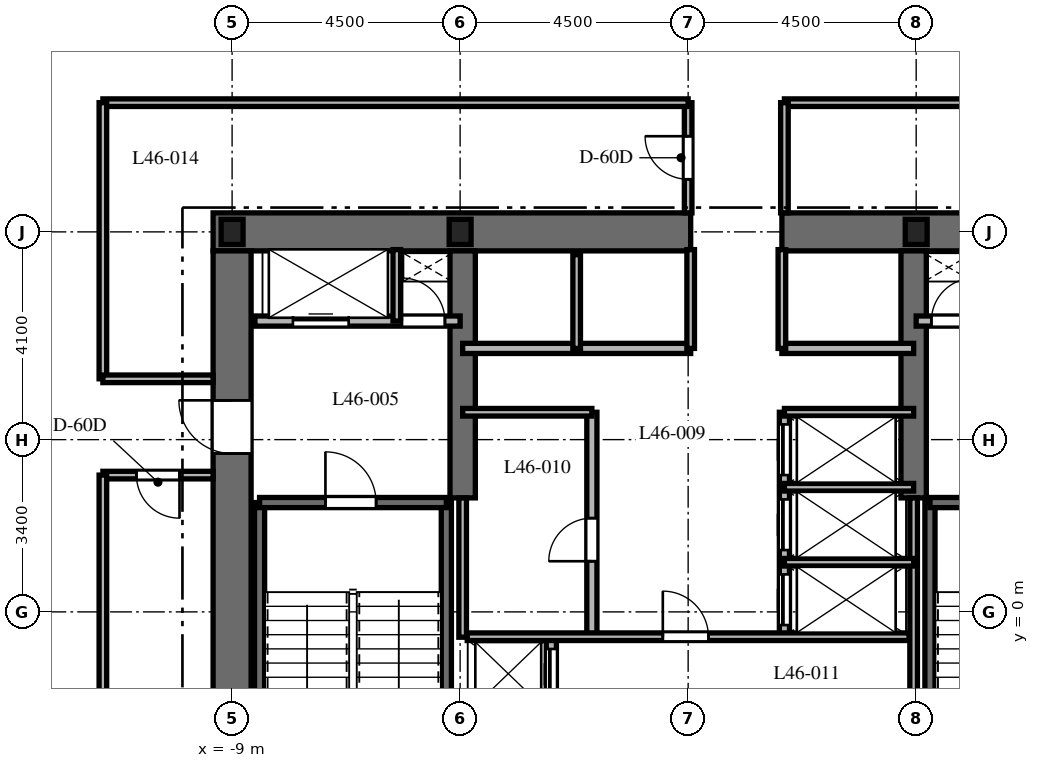
"""IFC4 building model, lengths in metres.
Left out: names, types, materials, properties, quantities, classifications, styles, units other than length and angle.
Written with IfcOpenShell. Run it as: python <this file> out.ifc"""

import sys

from ifc_helpers import new_model, si_unit, direction, frame, frame_2d, origin, origin_2d, place, context, subcontext, project, spatial, rectangle, i_section, extrude, element, fill, save


model = new_model("IFC4")
c1 = context("Model", 3, precision=1e-05, world=origin(), true_north=direction((0.0, 1.0)))
c2 = subcontext(c1, "Body", "Model", "MODEL_VIEW")
j1 = project(units=[si_unit("LENGTHUNIT", "METRE"), si_unit("PLANEANGLEUNIT", "RADIAN")], contexts=[c1])
p1 = place(None, origin())
s1 = spatial("IfcSite", under=j1, at=p1, CompositionType="ELEMENT")
p2 = place(p1, origin())
s2 = spatial("IfcBuilding", under=s1, at=p2, CompositionType="ELEMENT")
p3 = place(p2, frame((0.0, 0.0, 186.7)))
s3 = spatial("IfcBuildingStorey", under=s2, at=p3, CompositionType="ELEMENT", Elevation=186.7)
p4 = place(p3, frame((-9.375, 7.5, 0.0), z_axis=(0.0, 0.0, 1.0), x_axis=(1.0, 0.0, 0.0)))
e1 = element("IfcWall", 1, at=p4, inside=s3, PredefinedType="SHEAR", context=c2, shape_type="SweptSolid", body=[
    extrude(rectangle(XDim=9.425, YDim=0.75, at=frame_2d((4.712, 0.0))), origin(), (0.0, 0.0, 1.0), 3.7),
])
p5 = place(p3, frame((1.85, 7.5, 0.0), z_axis=(0.0, 0.0, 1.0), x_axis=(1.0, 0.0, 0.0)))
e2 = element("IfcWall", 2, at=p5, inside=s3, PredefinedType="SHEAR", context=c2, shape_type="SweptSolid", body=[
    extrude(rectangle(XDim=7.525, YDim=0.75, at=frame_2d((3.762, 0.0))), origin(), (0.0, 0.0, 1.0), 3.7),
])
p6 = place(p3, frame((-9.0, -7.125, 0.0), z_axis=(0.0, 0.0, 1.0), x_axis=(0.0, 1.0, 0.0)))
e3 = element("IfcWall", 3, at=p6, inside=s3, PredefinedType="SHEAR", context=c2, shape_type="SweptSolid", body=[
    extrude(rectangle(XDim=14.25, YDim=0.75, at=frame_2d((7.125, 0.0))), origin(), (0.0, 0.0, 1.0), 3.7),
])
p7 = place(p6, frame((10.25, 0.0, 0.0)))
e4 = element("IfcOpeningElement", 4, at=p7, cuts=e3, PredefinedType="OPENING", context=c2, shape_type="SweptSolid", body=[
    extrude(rectangle(XDim=1.05, YDim=2.15, at=frame_2d((0.525, 1.075))), frame((0.0, 0.385, 0.0), z_axis=(0.0, -1.0, 0.0), x_axis=(1.0, 0.0, 0.0)), (0.0, 0.0, 1.0), 0.77),
])
for number, where, z_axis, x_axis in (
    (5, (-4.45, 2.25, 0.0), (0.0, 0.0, 1.0), (0.0, 1.0, 0.0)),
    (6, (4.45, 2.25, 0.0), (0.0, 0.0, 1.0), (0.0, 1.0, 0.0)),
):
    element("IfcWall", number, at=place(p3, frame(where, z_axis=z_axis, x_axis=x_axis)), inside=s3, PredefinedType="SHEAR", context=c2, shape_type="SweptSolid", body=[
        extrude(rectangle(XDim=4.875, YDim=0.5, at=frame_2d((2.438, 0.0))), origin(), (0.0, 0.0, 1.0), 3.7),
    ])
for number, where, z_axis, x_axis in (
    (7, (-8.458, -6.985, 0.0), (0.0, 0.0, 1.0), (0.0, 1.0, 0.0)),
    (8, (-4.772, -6.985, 0.0), (0.0, 0.0, 1.0), (0.0, 1.0, 0.0)),
):
    element("IfcWall", number, at=place(p3, frame(where, z_axis=z_axis, x_axis=x_axis)), inside=s3, PredefinedType="SHEAR", context=c2, shape_type="SweptSolid", body=[
        extrude(rectangle(XDim=9.143, YDim=0.2, at=frame_2d((4.572, 0.0))), origin(), (0.0, 0.0, 1.0), 3.7),
    ])
p8 = place(p3, frame((-8.458, 2.158, 0.0), z_axis=(0.0, 0.0, 1.0), x_axis=(1.0, 0.0, 0.0)))
e9 = element("IfcWall", 9, at=p8, inside=s3, PredefinedType="SHEAR", context=c2, shape_type="SweptSolid", body=[
    extrude(rectangle(XDim=3.686, YDim=0.2, at=frame_2d((1.843, 0.0))), origin(), (0.0, 0.0, 1.0), 3.7),
])
p9 = place(p8, frame((1.3, 0.0, 0.0)))
e10 = element("IfcOpeningElement", 10, at=p9, cuts=e9, PredefinedType="OPENING", context=c2, shape_type="SweptSolid", body=[
    extrude(rectangle(XDim=1.0, YDim=2.15, at=frame_2d((0.5, 1.075))), frame((0.0, 0.11, 0.0), z_axis=(0.0, -1.0, 0.0), x_axis=(1.0, 0.0, 0.0)), (0.0, 0.0, 1.0), 0.22),
])
p10 = place(p3, frame((4.772, -6.985, 0.0), z_axis=(0.0, 0.0, 1.0), x_axis=(0.0, 1.0, 0.0)))
e11 = element("IfcWall", 11, at=p10, inside=s3, PredefinedType="SHEAR", context=c2, shape_type="SweptSolid", body=[
    extrude(rectangle(XDim=9.143, YDim=0.2, at=frame_2d((4.572, 0.0))), origin(), (0.0, 0.0, 1.0), 3.7),
])
p11 = place(p3, frame((4.772, 2.158, 0.0), z_axis=(0.0, 0.0, 1.0), x_axis=(1.0, 0.0, 0.0)))
e12 = element("IfcWall", 12, at=p11, inside=s3, PredefinedType="SHEAR", context=c2, shape_type="SweptSolid", body=[
    extrude(rectangle(XDim=3.686, YDim=0.2, at=frame_2d((1.843, 0.0))), origin(), (0.0, 0.0, 1.0), 3.7),
])
p12 = place(p11, frame((1.35, 0.0, 0.0)))
e13 = element("IfcOpeningElement", 13, at=p12, cuts=e12, PredefinedType="OPENING", context=c2, shape_type="SweptSolid", body=[
    extrude(rectangle(XDim=1.0, YDim=2.15, at=frame_2d((0.5, 1.075))), frame((0.0, 0.11, 0.0), z_axis=(0.0, -1.0, 0.0), x_axis=(1.0, 0.0, 0.0)), (0.0, 0.0, 1.0), 0.22),
])
for number, where, z_axis, x_axis in (
    (14, (4.5, 7.5, 0.0), (0.0, 0.0, 1.0), (1.0, 0.0, 0.0)),
    (15, (-4.5, 7.5, 0.0), (0.0, 0.0, 1.0), (1.0, 0.0, 0.0)),
    (16, (-9.0, 7.5, 0.0), (0.0, 0.0, 1.0), (1.0, 0.0, 0.0)),
):
    element("IfcColumn", number, at=place(p3, frame(where, z_axis=z_axis, x_axis=x_axis)), inside=s3, PredefinedType="COLUMN", context=c2, shape_type="SweptSolid", body=[
        extrude(i_section(OverallWidth=0.432, OverallDepth=0.498, WebThickness=0.056, FlangeThickness=0.089, at=origin_2d()), origin(), (0.0, 0.0, 1.0), 3.7),
    ])
p13 = place(p3, frame((-8.55, 5.74, 0.0), z_axis=(0.0, 0.0, 1.0), x_axis=(1.0, 0.0, 0.0)))
e17 = element("IfcWall", 17, at=p13, inside=s3, PredefinedType="PARTITIONING", context=c2, shape_type="SweptSolid", body=[
    extrude(rectangle(XDim=4.05, YDim=0.2, at=frame_2d((2.025, 0.0))), origin(), (0.0, 0.0, 1.0), 3.4),
])
p14 = place(p13, frame((0.75, 0.0, 0.0)))
e18 = element("IfcOpeningElement", 18, at=p14, cuts=e17, PredefinedType="OPENING", context=c2, shape_type="SweptSolid", body=[
    extrude(rectangle(XDim=1.1, YDim=2.2, at=frame_2d((0.55, 1.1))), frame((0.0, 0.11, 0.0), z_axis=(0.0, -1.0, 0.0), x_axis=(1.0, 0.0, 0.0)), (0.0, 0.0, 1.0), 0.22),
])
p15 = place(p13, frame((2.9, 0.0, 0.0)))
e19 = element("IfcOpeningElement", 19, at=p15, cuts=e17, PredefinedType="OPENING", context=c2, shape_type="SweptSolid", body=[
    extrude(rectangle(XDim=0.85, YDim=2.03, at=frame_2d((0.425, 1.015))), frame((0.0, 0.11, 0.0), z_axis=(0.0, -1.0, 0.0), x_axis=(1.0, 0.0, 0.0)), (0.0, 0.0, 1.0), 0.22),
])
p16 = place(p3, frame((-5.75, 5.74, 0.0), z_axis=(0.0, 0.0, 1.0), x_axis=(0.0, 1.0, 0.0)))
e20 = element("IfcWall", 20, at=p16, inside=s3, PredefinedType="PARTITIONING", context=c2, shape_type="SweptSolid", body=[
    extrude(rectangle(XDim=1.41, YDim=0.15, at=frame_2d((0.705, 0.0))), origin(), (0.0, 0.0, 1.0), 3.4),
])
p17 = place(p3, frame((4.5, 5.74, 0.0), z_axis=(0.0, 0.0, 1.0), x_axis=(1.0, 0.0, 0.0)))
e21 = element("IfcWall", 21, at=p17, inside=s3, PredefinedType="PARTITIONING", context=c2, shape_type="SweptSolid", body=[
    extrude(rectangle(XDim=4.05, YDim=0.2, at=frame_2d((2.025, 0.0))), origin(), (0.0, 0.0, 1.0), 3.4),
])
p18 = place(p17, frame((0.3, 0.0, 0.0)))
e22 = element("IfcOpeningElement", 22, at=p18, cuts=e21, PredefinedType="OPENING", context=c2, shape_type="SweptSolid", body=[
    extrude(rectangle(XDim=0.85, YDim=2.03, at=frame_2d((0.425, 1.015))), frame((0.0, 0.11, 0.0), z_axis=(0.0, -1.0, 0.0), x_axis=(1.0, 0.0, 0.0)), (0.0, 0.0, 1.0), 0.22),
])
p19 = place(p17, frame((2.15, 0.0, 0.0)))
e23 = element("IfcOpeningElement", 23, at=p19, cuts=e21, PredefinedType="OPENING", context=c2, shape_type="SweptSolid", body=[
    extrude(rectangle(XDim=1.1, YDim=2.2, at=frame_2d((0.55, 1.1))), frame((0.0, 0.11, 0.0), z_axis=(0.0, -1.0, 0.0), x_axis=(1.0, 0.0, 0.0)), (0.0, 0.0, 1.0), 0.22),
])
p20 = place(p3, frame((-2.7, -1.972, 0.0), z_axis=(0.0, 0.0, 1.0), x_axis=(0.0, 1.0, 0.0)))
e24 = element("IfcWall", 24, at=p20, inside=s3, PredefinedType="PARTITIONING", context=c2, shape_type="SweptSolid", body=[
    extrude(rectangle(XDim=1.472, YDim=0.2, at=frame_2d((0.736, 0.0))), origin(), (0.0, 0.0, 1.0), 3.4),
])
p21 = place(p20, frame((0.24, 0.0, 0.0)))
e25 = element("IfcOpeningElement", 25, at=p21, cuts=e24, PredefinedType="OPENING", context=c2, shape_type="SweptSolid", body=[
    extrude(rectangle(XDim=1.0, YDim=2.2, at=frame_2d((0.5, 1.1))), frame((0.0, 0.11, 0.0), z_axis=(0.0, -1.0, 0.0), x_axis=(1.0, 0.0, 0.0)), (0.0, 0.0, 1.0), 0.22),
])
p22 = place(p3, frame((-4.45, 5.2, 0.0), z_axis=(0.0, 0.0, 1.0), x_axis=(1.0, 0.0, 0.0)))
e26 = element("IfcWall", 26, at=p22, inside=s3, PredefinedType="PARTITIONING", context=c2, shape_type="SweptSolid", body=[
    extrude(rectangle(XDim=4.5, YDim=0.2, at=frame_2d((2.25, 0.0))), origin(), (0.0, 0.0, 1.0), 3.4),
])
p23 = place(p3, frame((1.85, 5.2, 0.0), z_axis=(0.0, 0.0, 1.0), x_axis=(1.0, 0.0, 0.0)))
e27 = element("IfcWall", 27, at=p23, inside=s3, PredefinedType="PARTITIONING", context=c2, shape_type="SweptSolid", body=[
    extrude(rectangle(XDim=2.6, YDim=0.2, at=frame_2d((1.3, 0.0))), origin(), (0.0, 0.0, 1.0), 3.4),
])
p24 = place(p3, frame((-2.2, 5.2, 0.0), z_axis=(0.0, 0.0, 1.0), x_axis=(0.0, 1.0, 0.0)))
e28 = element("IfcWall", 28, at=p24, inside=s3, PredefinedType="PARTITIONING", context=c2, shape_type="SweptSolid", body=[
    extrude(rectangle(XDim=1.85, YDim=0.15, at=frame_2d((0.925, 0.0))), origin(), (0.0, 0.0, 1.0), 3.4),
])
for number, where, z_axis, x_axis in (
    (29, (0.05, 5.2, 0.0), (0.0, 0.0, 1.0), (0.0, 1.0, 0.0)),
    (30, (1.85, 5.2, 0.0), (0.0, 0.0, 1.0), (0.0, 1.0, 0.0)),
):
    element("IfcWall", number, at=place(p3, frame(where, z_axis=z_axis, x_axis=x_axis)), inside=s3, PredefinedType="PARTITIONING", context=c2, shape_type="SweptSolid", body=[
        extrude(rectangle(XDim=1.95, YDim=0.15, at=frame_2d((0.975, 0.0))), origin(), (0.0, 0.0, 1.0), 3.4),
    ])
p25 = place(p3, frame((-4.45, -0.5, 0.0), z_axis=(0.0, 0.0, 1.0), x_axis=(0.0, 1.0, 0.0)))
e31 = element("IfcWall", 31, at=p25, inside=s3, PredefinedType="PARTITIONING", context=c2, shape_type="SweptSolid", body=[
    extrude(rectangle(XDim=2.75, YDim=0.15, at=frame_2d((1.375, 0.0))), origin(), (0.0, 0.0, 1.0), 3.4),
])
p26 = place(p3, frame((4.45, -1.972, 0.0), z_axis=(0.0, 0.0, 1.0), x_axis=(0.0, 1.0, 0.0)))
e32 = element("IfcWall", 32, at=p26, inside=s3, PredefinedType="PARTITIONING", context=c2, shape_type="SweptSolid", body=[
    extrude(rectangle(XDim=4.222, YDim=0.15, at=frame_2d((2.111, 0.0))), origin(), (0.0, 0.0, 1.0), 3.4),
])
p27 = place(p3, frame((-1.9, -0.5, 0.0), z_axis=(0.0, 0.0, 1.0), x_axis=(0.0, 1.0, 0.0)))
e33 = element("IfcWall", 33, at=p27, inside=s3, PredefinedType="PARTITIONING", context=c2, shape_type="SweptSolid", body=[
    extrude(rectangle(XDim=4.44, YDim=0.2, at=frame_2d((2.22, 0.0))), origin(), (0.0, 0.0, 1.0), 3.4),
])
p28 = place(p27, frame((1.5, 0.0, 0.0)))
e34 = element("IfcOpeningElement", 34, at=p28, cuts=e33, PredefinedType="OPENING", context=c2, shape_type="SweptSolid", body=[
    extrude(rectangle(XDim=0.85, YDim=2.03, at=frame_2d((0.425, 1.015))), frame((0.0, 0.11, 0.0), z_axis=(0.0, -1.0, 0.0), x_axis=(1.0, 0.0, 0.0)), (0.0, 0.0, 1.0), 0.22),
])
p29 = place(p3, frame((-4.45, 3.94, 0.0), z_axis=(0.0, 0.0, 1.0), x_axis=(1.0, 0.0, 0.0)))
e35 = element("IfcWall", 35, at=p29, inside=s3, PredefinedType="PARTITIONING", context=c2, shape_type="SweptSolid", body=[
    extrude(rectangle(XDim=2.55, YDim=0.15, at=frame_2d((1.275, 0.0))), origin(), (0.0, 0.0, 1.0), 3.4),
])
p30 = place(p3, frame((1.9, -0.5, 0.0), z_axis=(0.0, 0.0, 1.0), x_axis=(0.0, 1.0, 0.0)))
e36 = element("IfcWall", 36, at=p30, inside=s3, PredefinedType="PARTITIONING", context=c2, shape_type="SweptSolid", body=[
    extrude(rectangle(XDim=4.44, YDim=0.2, at=frame_2d((2.22, 0.0))), origin(), (0.0, 0.0, 1.0), 3.4),
])
p31 = place(p30, frame((0.24, 0.0, 0.0)))
e37 = element("IfcOpeningElement", 37, at=p31, cuts=e36, PredefinedType="OPENING", context=c2, shape_type="SweptSolid", body=[
    extrude(rectangle(XDim=1.0, YDim=2.2, at=frame_2d((0.5, 1.1))), frame((0.0, 0.11, 0.0), z_axis=(0.0, -1.0, 0.0), x_axis=(1.0, 0.0, 0.0)), (0.0, 0.0, 1.0), 0.22),
])
p32 = place(p30, frame((1.72, 0.0, 0.0)))
e38 = element("IfcOpeningElement", 38, at=p32, cuts=e36, PredefinedType="OPENING", context=c2, shape_type="SweptSolid", body=[
    extrude(rectangle(XDim=1.0, YDim=2.2, at=frame_2d((0.5, 1.1))), frame((0.0, 0.11, 0.0), z_axis=(0.0, -1.0, 0.0), x_axis=(1.0, 0.0, 0.0)), (0.0, 0.0, 1.0), 0.22),
])
p33 = place(p30, frame((3.2, 0.0, 0.0)))
e39 = element("IfcOpeningElement", 39, at=p33, cuts=e36, PredefinedType="OPENING", context=c2, shape_type="SweptSolid", body=[
    extrude(rectangle(XDim=1.0, YDim=2.2, at=frame_2d((0.5, 1.1))), frame((0.0, 0.11, 0.0), z_axis=(0.0, -1.0, 0.0), x_axis=(1.0, 0.0, 0.0)), (0.0, 0.0, 1.0), 0.22),
])
for number, where, z_axis, x_axis in (
    (40, (1.9, 3.94, 0.0), (0.0, 0.0, 1.0), (1.0, 0.0, 0.0)),
    (41, (1.9, 0.98, 0.0), (0.0, 0.0, 1.0), (1.0, 0.0, 0.0)),
    (42, (1.9, 2.46, 0.0), (0.0, 0.0, 1.0), (1.0, 0.0, 0.0)),
):
    element("IfcWall", number, at=place(p3, frame(where, z_axis=z_axis, x_axis=x_axis)), inside=s3, PredefinedType="PARTITIONING", context=c2, shape_type="SweptSolid", body=[
        extrude(rectangle(XDim=2.55, YDim=0.15, at=frame_2d((1.275, 0.0))), origin(), (0.0, 0.0, 1.0), 3.4),
    ])
p34 = place(p3, frame((-4.36, -0.49, 0.0), z_axis=(0.0, 0.0, 1.0), x_axis=(1.0, 0.0, 0.0)))
e43 = element("IfcWall", 43, at=p34, inside=s3, PredefinedType="PARTITIONING", context=c2, shape_type="SweptSolid", body=[
    extrude(rectangle(XDim=8.72, YDim=0.15, at=frame_2d((4.36, 0.0))), origin(), (0.0, 0.0, 1.0), 3.4),
])
p35 = place(p34, frame((3.86, 0.0, 0.0)))
e44 = element("IfcOpeningElement", 44, at=p35, cuts=e43, PredefinedType="OPENING", context=c2, shape_type="SweptSolid", body=[
    extrude(rectangle(XDim=0.9, YDim=2.03, at=frame_2d((0.45, 1.015))), frame((0.0, 0.085, 0.0), z_axis=(0.0, -1.0, 0.0), x_axis=(1.0, 0.0, 0.0)), (0.0, 0.0, 1.0), 0.17),
])
p36 = place(p3, frame((11.55, 10.05, 0.0), z_axis=(0.0, 0.0, 1.0), x_axis=(-1.0, 0.0, 0.0)))
e45 = element("IfcWall", 45, at=p36, inside=s3, PredefinedType="PARTITIONING", context=c2, shape_type="SweptSolid", body=[
    extrude(rectangle(XDim=9.65, YDim=0.15, at=frame_2d((4.825, 0.0))), origin(), (0.0, 0.0, 1.0), 2.84),
])
p37 = place(p3, frame((1.9, 10.05, 0.0), z_axis=(0.0, 0.0, 1.0), x_axis=(0.0, -1.0, 0.0)))
e46 = element("IfcWall", 46, at=p37, inside=s3, PredefinedType="PARTITIONING", context=c2, shape_type="SweptSolid", body=[
    extrude(rectangle(XDim=2.175, YDim=0.15, at=frame_2d((1.087, 0.0))), origin(), (0.0, 0.0, 1.0), 3.4),
])
p38 = place(p3, frame((0.0, 7.875, 0.0), z_axis=(0.0, 0.0, 1.0), x_axis=(0.0, 1.0, 0.0)))
e47 = element("IfcWall", 47, at=p38, inside=s3, PredefinedType="PARTITIONING", context=c2, shape_type="SweptSolid", body=[
    extrude(rectangle(XDim=2.175, YDim=0.15, at=frame_2d((1.087, 0.0))), origin(), (0.0, 0.0, 1.0), 3.4),
])
p39 = place(p38, frame((0.663, 0.0, 0.0)))
e48 = element("IfcOpeningElement", 48, at=p39, cuts=e47, PredefinedType="OPENING", context=c2, shape_type="SweptSolid", body=[
    extrude(rectangle(XDim=0.85, YDim=2.03, at=frame_2d((0.425, 1.015))), frame((0.0, 0.085, 0.0), z_axis=(0.0, -1.0, 0.0), x_axis=(1.0, 0.0, 0.0)), (0.0, 0.0, 1.0), 0.17),
])
p40 = place(p3, frame((0.0, 10.05, 0.0), z_axis=(0.0, 0.0, 1.0), x_axis=(-1.0, 0.0, 0.0)))
e49 = element("IfcWall", 49, at=p40, inside=s3, PredefinedType="PARTITIONING", context=c2, shape_type="SweptSolid", body=[
    extrude(rectangle(XDim=11.55, YDim=0.15, at=frame_2d((5.775, 0.0))), origin(), (0.0, 0.0, 1.0), 2.84),
])
p41 = place(p3, frame((-11.55, 10.05, 0.0), z_axis=(0.0, 0.0, 1.0), x_axis=(0.0, -1.0, 0.0)))
e50 = element("IfcWall", 50, at=p41, inside=s3, PredefinedType="PARTITIONING", context=c2, shape_type="SweptSolid", body=[
    extrude(rectangle(XDim=5.45, YDim=0.15, at=frame_2d((2.725, 0.0))), origin(), (0.0, 0.0, 1.0), 2.84),
])
p42 = place(p3, frame((-11.55, 4.6, 0.0), z_axis=(0.0, 0.0, 1.0), x_axis=(1.0, 0.0, 0.0)))
e51 = element("IfcWall", 51, at=p42, inside=s3, PredefinedType="PARTITIONING", context=c2, shape_type="SweptSolid", body=[
    extrude(rectangle(XDim=2.175, YDim=0.15, at=frame_2d((1.087, 0.0))), origin(), (0.0, 0.0, 1.0), 3.4),
])
p43 = place(p3, frame((-9.375, 2.7, 0.0), z_axis=(0.0, 0.0, 1.0), x_axis=(-1.0, 0.0, 0.0)))
e52 = element("IfcWall", 52, at=p43, inside=s3, PredefinedType="PARTITIONING", context=c2, shape_type="SweptSolid", body=[
    extrude(rectangle(XDim=2.175, YDim=0.15, at=frame_2d((1.087, 0.0))), origin(), (0.0, 0.0, 1.0), 3.4),
])
p44 = place(p43, frame((0.663, 0.0, 0.0)))
e53 = element("IfcOpeningElement", 53, at=p44, cuts=e52, PredefinedType="OPENING", context=c2, shape_type="SweptSolid", body=[
    extrude(rectangle(XDim=0.85, YDim=2.03, at=frame_2d((0.425, 1.015))), frame((0.0, 0.085, 0.0), z_axis=(0.0, -1.0, 0.0), x_axis=(1.0, 0.0, 0.0)), (0.0, 0.0, 1.0), 0.17),
])
p45 = place(p3, frame((-11.55, 2.7, 0.0), z_axis=(0.0, 0.0, 1.0), x_axis=(0.0, -1.0, 0.0)))
e54 = element("IfcWall", 54, at=p45, inside=s3, PredefinedType="PARTITIONING", context=c2, shape_type="SweptSolid", body=[
    extrude(rectangle(XDim=12.75, YDim=0.15, at=frame_2d((6.375, 0.0))), origin(), (0.0, 0.0, 1.0), 2.84),
])
p46 = place(p9, origin())
e55 = element("IfcDoor", 55, at=p46, inside=s3, OperationType="SINGLE_SWING_LEFT", PredefinedType="DOOR", context=c2, shape_type="SweptSolid", body=[
    extrude(rectangle(XDim=1.0, YDim=2.15, at=frame_2d((0.5, 1.075))), frame((0.0, 0.025, 0.0), z_axis=(0.0, -1.0, 0.0), x_axis=(1.0, 0.0, 0.0)), (0.0, 0.0, 1.0), 0.05),
])
fill(e10, e55)
p47 = place(p7, origin())
e56 = element("IfcDoor", 56, at=p47, inside=s3, OperationType="SINGLE_SWING_RIGHT", PredefinedType="DOOR", context=c2, shape_type="SweptSolid", body=[
    extrude(rectangle(XDim=1.05, YDim=2.15, at=frame_2d((0.525, 1.075))), frame((0.0, 0.025, 0.0), z_axis=(0.0, -1.0, 0.0), x_axis=(1.0, 0.0, 0.0)), (0.0, 0.0, 1.0), 0.05),
])
fill(e4, e56)
p48 = place(p14, origin())
e57 = element("IfcDoor", 57, at=p48, inside=s3, OperationType="SLIDING_TO_LEFT", PredefinedType="DOOR", context=c2, shape_type="SweptSolid", body=[
    extrude(rectangle(XDim=1.1, YDim=2.2, at=frame_2d((0.55, 1.1))), frame((0.0, 0.025, 0.0), z_axis=(0.0, -1.0, 0.0), x_axis=(1.0, 0.0, 0.0)), (0.0, 0.0, 1.0), 0.05),
])
fill(e18, e57)
p49 = place(p15, origin())
e58 = element("IfcDoor", 58, at=p49, inside=s3, OperationType="SINGLE_SWING_LEFT", PredefinedType="DOOR", context=c2, shape_type="SweptSolid", body=[
    extrude(rectangle(XDim=0.85, YDim=2.03, at=frame_2d((0.425, 1.015))), frame((0.0, 0.025, 0.0), z_axis=(0.0, -1.0, 0.0), x_axis=(1.0, 0.0, 0.0)), (0.0, 0.0, 1.0), 0.05),
])
fill(e19, e58)
p50 = place(p18, origin())
e59 = element("IfcDoor", 59, at=p50, inside=s3, OperationType="SINGLE_SWING_RIGHT", PredefinedType="DOOR", context=c2, shape_type="SweptSolid", body=[
    extrude(rectangle(XDim=0.85, YDim=2.03, at=frame_2d((0.425, 1.015))), frame((0.0, 0.025, 0.0), z_axis=(0.0, -1.0, 0.0), x_axis=(1.0, 0.0, 0.0)), (0.0, 0.0, 1.0), 0.05),
])
fill(e22, e59)
p51 = place(p21, origin())
e60 = element("IfcDoor", 60, at=p51, inside=s3, OperationType="SLIDING_TO_LEFT", PredefinedType="DOOR", context=c2, shape_type="SweptSolid", body=[
    extrude(rectangle(XDim=1.0, YDim=2.2, at=frame_2d((0.5, 1.1))), frame((0.0, 0.025, 0.0), z_axis=(0.0, -1.0, 0.0), x_axis=(1.0, 0.0, 0.0)), (0.0, 0.0, 1.0), 0.05),
])
fill(e25, e60)
p52 = place(p28, origin())
e61 = element("IfcDoor", 61, at=p52, inside=s3, OperationType="SINGLE_SWING_LEFT", PredefinedType="DOOR", context=c2, shape_type="SweptSolid", body=[
    extrude(rectangle(XDim=0.85, YDim=2.03, at=frame_2d((0.425, 1.015))), frame((0.0, 0.025, 0.0), z_axis=(0.0, -1.0, 0.0), x_axis=(1.0, 0.0, 0.0)), (0.0, 0.0, 1.0), 0.05),
])
fill(e34, e61)
p53 = place(p31, origin())
e62 = element("IfcDoor", 62, at=p53, inside=s3, OperationType="SLIDING_TO_RIGHT", PredefinedType="DOOR", context=c2, shape_type="SweptSolid", body=[
    extrude(rectangle(XDim=1.0, YDim=2.2, at=frame_2d((0.5, 1.1))), frame((0.0, 0.025, 0.0), z_axis=(0.0, -1.0, 0.0), x_axis=(1.0, 0.0, 0.0)), (0.0, 0.0, 1.0), 0.05),
])
fill(e37, e62)
p54 = place(p32, origin())
e63 = element("IfcDoor", 63, at=p54, inside=s3, OperationType="SLIDING_TO_RIGHT", PredefinedType="DOOR", context=c2, shape_type="SweptSolid", body=[
    extrude(rectangle(XDim=1.0, YDim=2.2, at=frame_2d((0.5, 1.1))), frame((0.0, 0.025, 0.0), z_axis=(0.0, -1.0, 0.0), x_axis=(1.0, 0.0, 0.0)), (0.0, 0.0, 1.0), 0.05),
])
fill(e38, e63)
p55 = place(p33, origin())
e64 = element("IfcDoor", 64, at=p55, inside=s3, OperationType="SLIDING_TO_RIGHT", PredefinedType="DOOR", context=c2, shape_type="SweptSolid", body=[
    extrude(rectangle(XDim=1.0, YDim=2.2, at=frame_2d((0.5, 1.1))), frame((0.0, 0.025, 0.0), z_axis=(0.0, -1.0, 0.0), x_axis=(1.0, 0.0, 0.0)), (0.0, 0.0, 1.0), 0.05),
])
fill(e39, e64)
p56 = place(p35, origin())
e65 = element("IfcDoor", 65, at=p56, inside=s3, OperationType="SINGLE_SWING_LEFT", PredefinedType="DOOR", context=c2, shape_type="SweptSolid", body=[
    extrude(rectangle(XDim=0.9, YDim=2.03, at=frame_2d((0.45, 1.015))), frame((0.0, 0.025, 0.0), z_axis=(0.0, -1.0, 0.0), x_axis=(1.0, 0.0, 0.0)), (0.0, 0.0, 1.0), 0.05),
])
fill(e44, e65)
p57 = place(p44, origin())
e66 = element("IfcDoor", 66, at=p57, inside=s3, OperationType="SINGLE_SWING_LEFT", PredefinedType="DOOR", context=c2, shape_type="SweptSolid", body=[
    extrude(rectangle(XDim=0.85, YDim=2.03, at=frame_2d((0.425, 1.015))), frame((0.0, 0.025, 0.0), z_axis=(0.0, -1.0, 0.0), x_axis=(1.0, 0.0, 0.0)), (0.0, 0.0, 1.0), 0.05),
])
fill(e53, e66)
p58 = place(p39, origin())
e67 = element("IfcDoor", 67, at=p58, inside=s3, OperationType="SINGLE_SWING_RIGHT", PredefinedType="DOOR", context=c2, shape_type="SweptSolid", body=[
    extrude(rectangle(XDim=0.85, YDim=2.03, at=frame_2d((0.425, 1.015))), frame((0.0, 0.025, 0.0), z_axis=(0.0, -1.0, 0.0), x_axis=(1.0, 0.0, 0.0)), (0.0, 0.0, 1.0), 0.05),
])
fill(e48, e67)
save(model, sys.argv[1])
